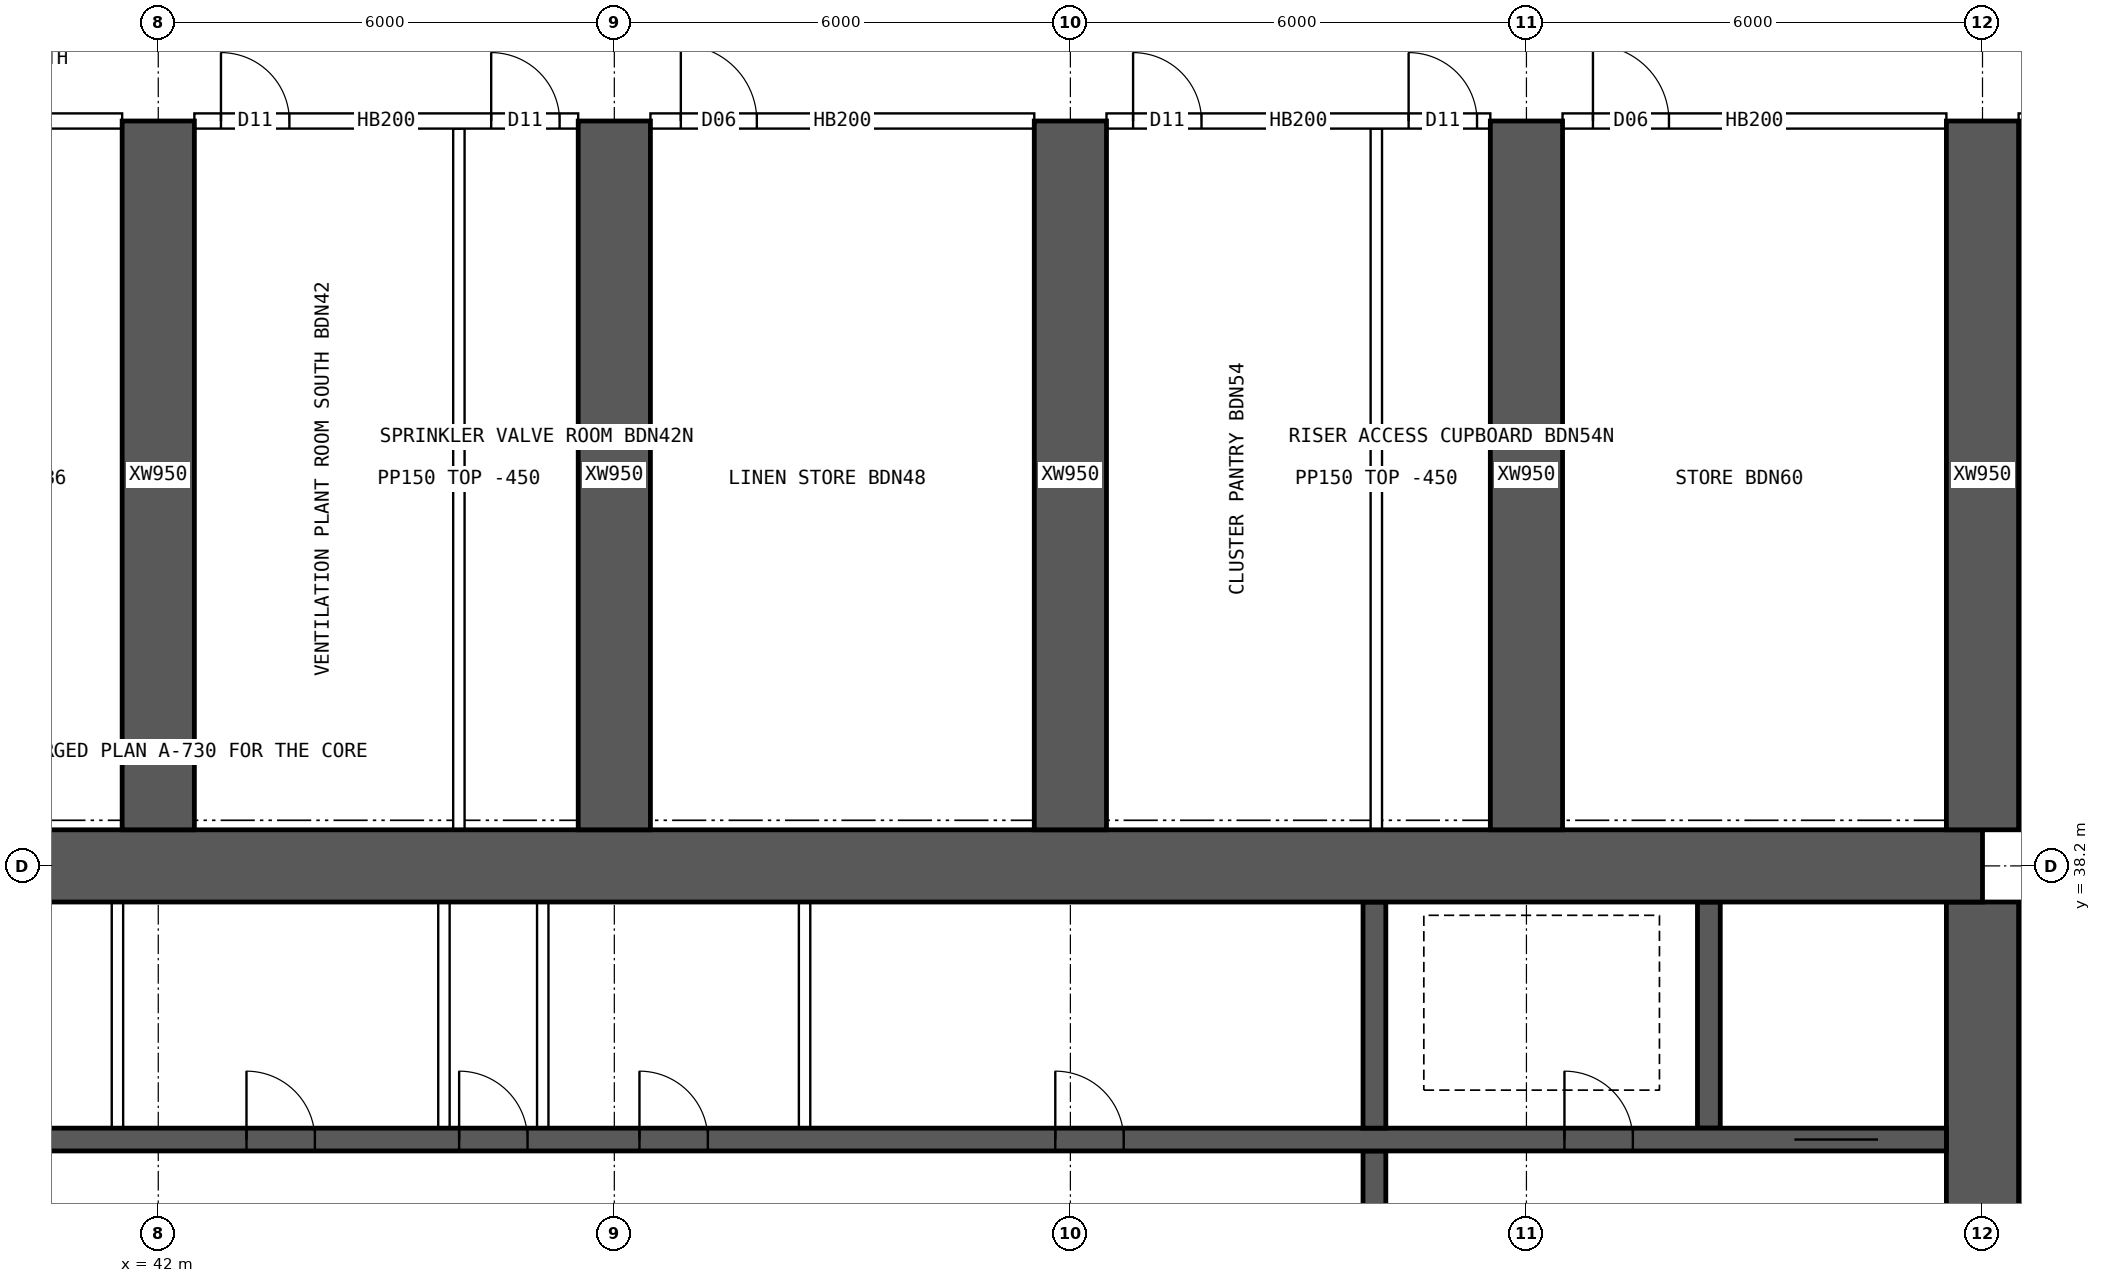
"""IFC4 building model, lengths in metres.
Left out: names, types, materials, properties, quantities, classifications, styles, units other than length and angle.
Written with IfcOpenShell. Run it as: python <this file> out.ifc"""

import sys

from ifc_helpers import new_model, si_unit, direction, frame, frame_2d, origin, place, context, subcontext, project, spatial, rectangle, extrude, element, fill, save


model = new_model("IFC4")
c1 = context("Model", 3, precision=1e-05, world=origin(), true_north=direction((0.0, 1.0)))
c2 = subcontext(c1, "Body", "Model", "MODEL_VIEW")
j1 = project(units=[si_unit("LENGTHUNIT", "METRE"), si_unit("PLANEANGLEUNIT", "RADIAN")], contexts=[c1])
p1 = place(None, origin())
s1 = spatial("IfcSite", under=j1, at=p1, CompositionType="ELEMENT")
p2 = place(p1, origin())
s2 = spatial("IfcBuilding", under=s1, at=p2, CompositionType="ELEMENT")
p3 = place(p2, frame((0.0, 0.0, 110.65)))
s3 = spatial("IfcBuildingStorey", under=s2, at=p3, CompositionType="ELEMENT", Elevation=110.65)
p4 = place(p3, frame((18.0, 38.2, 0.0), z_axis=(0.0, 0.0, 1.0), x_axis=(1.0, 0.0, 0.0)))
e1 = element("IfcWall", 1, at=p4, inside=s3, PredefinedType="SHEAR", context=c2, shape_type="SweptSolid", body=[
    extrude(rectangle(XDim=48.0, YDim=0.95, at=frame_2d((24.0, 0.0))), origin(), (0.0, 0.0, 1.0), 3.75),
])
p5 = place(p3, frame((66.0, 26.275, 0.0), z_axis=(0.0, 0.0, 1.0), x_axis=(0.0, 1.0, 0.0)))
e2 = element("IfcWall", 2, at=p5, inside=s3, PredefinedType="SHEAR", context=c2, shape_type="SweptSolid", body=[
    extrude(rectangle(XDim=11.45, YDim=0.95, at=frame_2d((5.725, 0.0))), origin(), (0.0, 0.0, 1.0), 3.75),
])
p6 = place(p5, frame((5.025, 0.0, 0.0)))
e3 = element("IfcOpeningElement", 3, at=p6, cuts=e2, PredefinedType="OPENING", context=c2, shape_type="SweptSolid", body=[
    extrude(rectangle(XDim=1.2, YDim=2.1, at=frame_2d((0.6, 1.05))), frame((0.0, 0.485, 0.0), z_axis=(0.0, -1.0, 0.0), x_axis=(1.0, 0.0, 0.0)), (0.0, 0.0, 1.0), 0.97),
])
p7 = place(p3, frame((18.475, 34.6, 0.0), z_axis=(0.0, 0.0, 1.0), x_axis=(1.0, 0.0, 0.0)))
e4 = element("IfcWall", 4, at=p7, inside=s3, PredefinedType="SHEAR", context=c2, shape_type="SweptSolid", body=[
    extrude(rectangle(XDim=47.05, YDim=0.3, at=frame_2d((23.525, 0.0))), origin(), (0.0, 0.0, 1.0), 3.75),
])
p8 = place(p7, frame((0.9, 0.0, 0.0)))
e5 = element("IfcOpeningElement", 5, at=p8, cuts=e4, PredefinedType="OPENING", context=c2, shape_type="SweptSolid", body=[
    extrude(rectangle(XDim=1.1, YDim=2.1, at=frame_2d((0.55, 1.05))), frame((0.0, 0.16, 0.0), z_axis=(0.0, -1.0, 0.0), x_axis=(1.0, 0.0, 0.0)), (0.0, 0.0, 1.0), 0.32),
])
p9 = place(p7, frame((45.05, 0.0, 0.0)))
e6 = element("IfcOpeningElement", 6, at=p9, cuts=e4, PredefinedType="OPENING", context=c2, shape_type="SweptSolid", body=[
    extrude(rectangle(XDim=1.1, YDim=2.1, at=frame_2d((0.55, 1.05))), frame((0.0, 0.16, 0.0), z_axis=(0.0, -1.0, 0.0), x_axis=(1.0, 0.0, 0.0)), (0.0, 0.0, 1.0), 0.32),
])
p10 = place(p7, frame((4.125, 0.0, 0.0)))
e7 = element("IfcOpeningElement", 7, at=p10, cuts=e4, PredefinedType="OPENING", context=c2, shape_type="SweptSolid", body=[
    extrude(rectangle(XDim=0.9, YDim=2.1, at=frame_2d((0.45, 1.05))), frame((0.0, 0.16, 0.0), z_axis=(0.0, -1.0, 0.0), x_axis=(1.0, 0.0, 0.0)), (0.0, 0.0, 1.0), 0.32),
])
p11 = place(p7, frame((42.025, 0.0, 0.0)))
e8 = element("IfcOpeningElement", 8, at=p11, cuts=e4, PredefinedType="OPENING", context=c2, shape_type="SweptSolid", body=[
    extrude(rectangle(XDim=0.9, YDim=2.1, at=frame_2d((0.45, 1.05))), frame((0.0, 0.16, 0.0), z_axis=(0.0, -1.0, 0.0), x_axis=(1.0, 0.0, 0.0)), (0.0, 0.0, 1.0), 0.32),
])
p12 = place(p7, frame((8.9, 0.0, 0.0)))
e9 = element("IfcOpeningElement", 9, at=p12, cuts=e4, PredefinedType="OPENING", context=c2, shape_type="SweptSolid", body=[
    extrude(rectangle(XDim=0.9, YDim=2.1, at=frame_2d((0.45, 1.05))), frame((0.0, 0.16, 0.0), z_axis=(0.0, -1.0, 0.0), x_axis=(1.0, 0.0, 0.0)), (0.0, 0.0, 1.0), 0.32),
])
p13 = place(p7, frame((12.874, 0.0, 0.0)))
e10 = element("IfcOpeningElement", 10, at=p13, cuts=e4, PredefinedType="OPENING", context=c2, shape_type="SweptSolid", body=[
    extrude(rectangle(XDim=0.9, YDim=2.1, at=frame_2d((0.45, 1.05))), frame((0.0, 0.16, 0.0), z_axis=(0.0, -1.0, 0.0), x_axis=(1.0, 0.0, 0.0)), (0.0, 0.0, 1.0), 0.32),
])
p14 = place(p7, frame((16.521, 0.0, 0.0)))
e11 = element("IfcOpeningElement", 11, at=p14, cuts=e4, PredefinedType="OPENING", context=c2, shape_type="SweptSolid", body=[
    extrude(rectangle(XDim=0.9, YDim=2.1, at=frame_2d((0.45, 1.05))), frame((0.0, 0.16, 0.0), z_axis=(0.0, -1.0, 0.0), x_axis=(1.0, 0.0, 0.0)), (0.0, 0.0, 1.0), 0.32),
])
p15 = place(p7, frame((20.28, 0.0, 0.0)))
e12 = element("IfcOpeningElement", 12, at=p15, cuts=e4, PredefinedType="OPENING", context=c2, shape_type="SweptSolid", body=[
    extrude(rectangle(XDim=0.9, YDim=2.1, at=frame_2d((0.45, 1.05))), frame((0.0, 0.16, 0.0), z_axis=(0.0, -1.0, 0.0), x_axis=(1.0, 0.0, 0.0)), (0.0, 0.0, 1.0), 0.32),
])
p16 = place(p7, frame((24.686, 0.0, 0.0)))
e13 = element("IfcOpeningElement", 13, at=p16, cuts=e4, PredefinedType="OPENING", context=c2, shape_type="SweptSolid", body=[
    extrude(rectangle(XDim=0.9, YDim=2.1, at=frame_2d((0.45, 1.05))), frame((0.0, 0.16, 0.0), z_axis=(0.0, -1.0, 0.0), x_axis=(1.0, 0.0, 0.0)), (0.0, 0.0, 1.0), 0.32),
])
p17 = place(p7, frame((27.483, 0.0, 0.0)))
e14 = element("IfcOpeningElement", 14, at=p17, cuts=e4, PredefinedType="OPENING", context=c2, shape_type="SweptSolid", body=[
    extrude(rectangle(XDim=0.9, YDim=2.1, at=frame_2d((0.45, 1.05))), frame((0.0, 0.16, 0.0), z_axis=(0.0, -1.0, 0.0), x_axis=(1.0, 0.0, 0.0)), (0.0, 0.0, 1.0), 0.32),
])
p18 = place(p7, frame((29.856, 0.0, 0.0)))
e15 = element("IfcOpeningElement", 15, at=p18, cuts=e4, PredefinedType="OPENING", context=c2, shape_type="SweptSolid", body=[
    extrude(rectangle(XDim=0.9, YDim=2.1, at=frame_2d((0.45, 1.05))), frame((0.0, 0.16, 0.0), z_axis=(0.0, -1.0, 0.0), x_axis=(1.0, 0.0, 0.0)), (0.0, 0.0, 1.0), 0.32),
])
p19 = place(p7, frame((35.326, 0.0, 0.0)))
e16 = element("IfcOpeningElement", 16, at=p19, cuts=e4, PredefinedType="OPENING", context=c2, shape_type="SweptSolid", body=[
    extrude(rectangle(XDim=0.9, YDim=2.1, at=frame_2d((0.45, 1.05))), frame((0.0, 0.16, 0.0), z_axis=(0.0, -1.0, 0.0), x_axis=(1.0, 0.0, 0.0)), (0.0, 0.0, 1.0), 0.32),
])
p20 = place(p3, frame((58.0, 30.55, 0.0), z_axis=(0.0, 0.0, 1.0), x_axis=(0.0, 1.0, 0.0)))
e17 = element("IfcWall", 17, at=p20, inside=s3, PredefinedType="SHEAR", context=c2, shape_type="SweptSolid", body=[
    extrude(rectangle(XDim=3.9, YDim=0.3, at=frame_2d((1.95, 0.0))), origin(), (0.0, 0.0, 1.0), 3.75),
])
p21 = place(p20, frame((1.4, 0.0, 0.0)))
e18 = element("IfcOpeningElement", 18, at=p21, cuts=e17, PredefinedType="OPENING", context=c2, shape_type="SweptSolid", body=[
    extrude(rectangle(XDim=1.2, YDim=2.1, at=frame_2d((0.6, 1.05))), frame((0.0, 0.16, 0.0), z_axis=(0.0, -1.0, 0.0), x_axis=(1.0, 0.0, 0.0)), (0.0, 0.0, 1.0), 0.32),
])
for number, where, z_axis, x_axis in (
    (19, (62.4, 34.75, 0.0), (0.0, 0.0, 1.0), (0.0, 1.0, 0.0)),
    (20, (58.0, 34.75, 0.0), (0.0, 0.0, 1.0), (0.0, 1.0, 0.0)),
):
    element("IfcWall", number, at=place(p3, frame(where, z_axis=z_axis, x_axis=x_axis)), inside=s3, PredefinedType="SHEAR", context=c2, shape_type="SweptSolid", body=[
        extrude(rectangle(XDim=2.975, YDim=0.3, at=frame_2d((1.488, 0.0))), origin(), (0.0, 0.0, 1.0), 3.75),
    ])
for number, where, z_axis, x_axis in (
    (21, (42.0, 38.675, 0.0), (0.0, 0.0, 1.0), (0.0, 1.0, 0.0)),
    (22, (48.0, 38.675, 0.0), (0.0, 0.0, 1.0), (0.0, 1.0, 0.0)),
    (23, (54.0, 38.675, 0.0), (0.0, 0.0, 1.0), (0.0, 1.0, 0.0)),
    (24, (60.0, 38.675, 0.0), (0.0, 0.0, 1.0), (0.0, 1.0, 0.0)),
    (25, (66.0, 38.675, 0.0), (0.0, 0.0, 1.0), (0.0, 1.0, 0.0)),
):
    element("IfcWall", number, at=place(p3, frame(where, z_axis=z_axis, x_axis=x_axis)), inside=s3, PredefinedType="SHEAR", context=c2, shape_type="SweptSolid", body=[
        extrude(rectangle(XDim=9.325, YDim=0.95, at=frame_2d((4.663, 0.0))), origin(), (0.0, 0.0, 1.0), 3.75),
    ])
for number, where, z_axis, x_axis in (
    (26, (41.463, 34.75, 0.0), (0.0, 0.0, 1.0), (0.0, 1.0, 0.0)),
    (27, (45.758, 34.75, 0.0), (0.0, 0.0, 1.0), (0.0, 1.0, 0.0)),
    (28, (47.058, 34.75, 0.0), (0.0, 0.0, 1.0), (0.0, 1.0, 0.0)),
    (29, (50.503, 34.75, 0.0), (0.0, 0.0, 1.0), (0.0, 1.0, 0.0)),
):
    element("IfcWall", number, at=place(p3, frame(where, z_axis=z_axis, x_axis=x_axis)), inside=s3, PredefinedType="SOLIDWALL", context=c2, shape_type="SweptSolid", body=[
        extrude(rectangle(XDim=2.975, YDim=0.15, at=frame_2d((1.488, 0.0))), origin(), (0.0, 0.0, 1.0), 3.3),
    ])
p22 = place(p3, frame((36.475, 48.0, 0.0), z_axis=(0.0, 0.0, 1.0), x_axis=(1.0, 0.0, 0.0)))
e30 = element("IfcWall", 30, at=p22, inside=s3, PredefinedType="SOLIDWALL", context=c2, shape_type="SweptSolid", body=[
    extrude(rectangle(XDim=5.05, YDim=0.2, at=frame_2d((2.525, 0.0))), origin(), (0.0, 0.0, 1.0), 3.3),
])
p23 = place(p22, frame((0.4, 0.0, 0.0)))
e31 = element("IfcOpeningElement", 31, at=p23, cuts=e30, PredefinedType="OPENING", context=c2, shape_type="SweptSolid", body=[
    extrude(rectangle(XDim=1.0, YDim=2.1, at=frame_2d((0.5, 1.05))), frame((0.0, 0.11, 0.0), z_axis=(0.0, -1.0, 0.0), x_axis=(1.0, 0.0, 0.0)), (0.0, 0.0, 1.0), 0.22),
])
p24 = place(p3, frame((42.475, 48.0, 0.0), z_axis=(0.0, 0.0, 1.0), x_axis=(1.0, 0.0, 0.0)))
e32 = element("IfcWall", 32, at=p24, inside=s3, PredefinedType="SOLIDWALL", context=c2, shape_type="SweptSolid", body=[
    extrude(rectangle(XDim=5.05, YDim=0.2, at=frame_2d((2.525, 0.0))), origin(), (0.0, 0.0, 1.0), 3.3),
])
p25 = place(p24, frame((0.35, 0.0, 0.0)))
e33 = element("IfcOpeningElement", 33, at=p25, cuts=e32, PredefinedType="OPENING", context=c2, shape_type="SweptSolid", body=[
    extrude(rectangle(XDim=0.9, YDim=2.1, at=frame_2d((0.45, 1.05))), frame((0.0, 0.11, 0.0), z_axis=(0.0, -1.0, 0.0), x_axis=(1.0, 0.0, 0.0)), (0.0, 0.0, 1.0), 0.22),
])
p26 = place(p24, frame((3.905, 0.0, 0.0)))
e34 = element("IfcOpeningElement", 34, at=p26, cuts=e32, PredefinedType="OPENING", context=c2, shape_type="SweptSolid", body=[
    extrude(rectangle(XDim=0.9, YDim=2.1, at=frame_2d((0.45, 1.05))), frame((0.0, 0.11, 0.0), z_axis=(0.0, -1.0, 0.0), x_axis=(1.0, 0.0, 0.0)), (0.0, 0.0, 1.0), 0.22),
])
p27 = place(p3, frame((48.475, 48.0, 0.0), z_axis=(0.0, 0.0, 1.0), x_axis=(1.0, 0.0, 0.0)))
e35 = element("IfcWall", 35, at=p27, inside=s3, PredefinedType="SOLIDWALL", context=c2, shape_type="SweptSolid", body=[
    extrude(rectangle(XDim=5.05, YDim=0.2, at=frame_2d((2.525, 0.0))), origin(), (0.0, 0.0, 1.0), 3.3),
])
p28 = place(p27, frame((0.4, 0.0, 0.0)))
e36 = element("IfcOpeningElement", 36, at=p28, cuts=e35, PredefinedType="OPENING", context=c2, shape_type="SweptSolid", body=[
    extrude(rectangle(XDim=1.0, YDim=2.1, at=frame_2d((0.5, 1.05))), frame((0.0, 0.11, 0.0), z_axis=(0.0, -1.0, 0.0), x_axis=(1.0, 0.0, 0.0)), (0.0, 0.0, 1.0), 0.22),
])
p29 = place(p3, frame((54.475, 48.0, 0.0), z_axis=(0.0, 0.0, 1.0), x_axis=(1.0, 0.0, 0.0)))
e37 = element("IfcWall", 37, at=p29, inside=s3, PredefinedType="SOLIDWALL", context=c2, shape_type="SweptSolid", body=[
    extrude(rectangle(XDim=5.05, YDim=0.2, at=frame_2d((2.525, 0.0))), origin(), (0.0, 0.0, 1.0), 3.3),
])
p30 = place(p29, frame((0.35, 0.0, 0.0)))
e38 = element("IfcOpeningElement", 38, at=p30, cuts=e37, PredefinedType="OPENING", context=c2, shape_type="SweptSolid", body=[
    extrude(rectangle(XDim=0.9, YDim=2.1, at=frame_2d((0.45, 1.05))), frame((0.0, 0.11, 0.0), z_axis=(0.0, -1.0, 0.0), x_axis=(1.0, 0.0, 0.0)), (0.0, 0.0, 1.0), 0.22),
])
p31 = place(p29, frame((3.975, 0.0, 0.0)))
e39 = element("IfcOpeningElement", 39, at=p31, cuts=e37, PredefinedType="OPENING", context=c2, shape_type="SweptSolid", body=[
    extrude(rectangle(XDim=0.9, YDim=2.1, at=frame_2d((0.45, 1.05))), frame((0.0, 0.11, 0.0), z_axis=(0.0, -1.0, 0.0), x_axis=(1.0, 0.0, 0.0)), (0.0, 0.0, 1.0), 0.22),
])
p32 = place(p3, frame((60.475, 48.0, 0.0), z_axis=(0.0, 0.0, 1.0), x_axis=(1.0, 0.0, 0.0)))
e40 = element("IfcWall", 40, at=p32, inside=s3, PredefinedType="SOLIDWALL", context=c2, shape_type="SweptSolid", body=[
    extrude(rectangle(XDim=5.05, YDim=0.2, at=frame_2d((2.525, 0.0))), origin(), (0.0, 0.0, 1.0), 3.3),
])
p33 = place(p32, frame((0.4, 0.0, 0.0)))
e41 = element("IfcOpeningElement", 41, at=p33, cuts=e40, PredefinedType="OPENING", context=c2, shape_type="SweptSolid", body=[
    extrude(rectangle(XDim=1.0, YDim=2.1, at=frame_2d((0.5, 1.05))), frame((0.0, 0.11, 0.0), z_axis=(0.0, -1.0, 0.0), x_axis=(1.0, 0.0, 0.0)), (0.0, 0.0, 1.0), 0.22),
])
p34 = place(p3, frame((66.475, 48.0, 0.0), z_axis=(0.0, 0.0, 1.0), x_axis=(1.0, 0.0, 0.0)))
e42 = element("IfcWall", 42, at=p34, inside=s3, PredefinedType="SOLIDWALL", context=c2, shape_type="SweptSolid", body=[
    extrude(rectangle(XDim=1.925, YDim=0.2, at=frame_2d((0.962, 0.0))), origin(), (0.0, 0.0, 1.0), 3.3),
])
p35 = place(p34, frame((0.05, 0.0, 0.0)))
e43 = element("IfcOpeningElement", 43, at=p35, cuts=e42, PredefinedType="OPENING", context=c2, shape_type="SweptSolid", body=[
    extrude(rectangle(XDim=1.2, YDim=2.1, at=frame_2d((0.6, 1.05))), frame((0.0, 0.11, 0.0), z_axis=(0.0, -1.0, 0.0), x_axis=(1.0, 0.0, 0.0)), (0.0, 0.0, 1.0), 0.22),
])
for number, where, z_axis, x_axis in (
    (44, (45.955, 38.675, 0.0), (0.0, 0.0, 1.0), (0.0, 1.0, 0.0)),
    (45, (58.025, 38.675, 0.0), (0.0, 0.0, 1.0), (0.0, 1.0, 0.0)),
):
    element("IfcWall", number, at=place(p3, frame(where, z_axis=z_axis, x_axis=x_axis)), inside=s3, PredefinedType="PARTITIONING", context=c2, shape_type="SweptSolid", body=[
        extrude(rectangle(XDim=9.225, YDim=0.15, at=frame_2d((4.612, 0.0))), origin(), (0.0, 0.0, 1.0), 3.3),
    ])
p36 = place(p9, origin())
e46 = element("IfcDoor", 46, at=p36, inside=s3, OperationType="DOUBLE_DOOR_SLIDING", PredefinedType="DOOR", context=c2, shape_type="SweptSolid", body=[
    extrude(rectangle(XDim=1.1, YDim=2.1, at=frame_2d((0.55, 1.05))), frame((0.0, 0.025, 0.0), z_axis=(0.0, -1.0, 0.0), x_axis=(1.0, 0.0, 0.0)), (0.0, 0.0, 1.0), 0.05),
])
fill(e6, e46)
p37 = place(p11, origin())
e47 = element("IfcDoor", 47, at=p37, inside=s3, OperationType="SINGLE_SWING_LEFT", PredefinedType="DOOR", context=c2, shape_type="SweptSolid", body=[
    extrude(rectangle(XDim=0.9, YDim=2.1, at=frame_2d((0.45, 1.05))), frame((0.0, 0.025, 0.0), z_axis=(0.0, -1.0, 0.0), x_axis=(1.0, 0.0, 0.0)), (0.0, 0.0, 1.0), 0.05),
])
fill(e8, e47)
p38 = place(p16, origin())
e48 = element("IfcDoor", 48, at=p38, inside=s3, OperationType="SINGLE_SWING_LEFT", PredefinedType="DOOR", context=c2, shape_type="SweptSolid", body=[
    extrude(rectangle(XDim=0.9, YDim=2.1, at=frame_2d((0.45, 1.05))), frame((0.0, 0.025, 0.0), z_axis=(0.0, -1.0, 0.0), x_axis=(1.0, 0.0, 0.0)), (0.0, 0.0, 1.0), 0.05),
])
fill(e13, e48)
p39 = place(p17, origin())
e49 = element("IfcDoor", 49, at=p39, inside=s3, OperationType="SINGLE_SWING_LEFT", PredefinedType="DOOR", context=c2, shape_type="SweptSolid", body=[
    extrude(rectangle(XDim=0.9, YDim=2.1, at=frame_2d((0.45, 1.05))), frame((0.0, 0.025, 0.0), z_axis=(0.0, -1.0, 0.0), x_axis=(1.0, 0.0, 0.0)), (0.0, 0.0, 1.0), 0.05),
])
fill(e14, e49)
p40 = place(p18, origin())
e50 = element("IfcDoor", 50, at=p40, inside=s3, OperationType="SINGLE_SWING_LEFT", PredefinedType="DOOR", context=c2, shape_type="SweptSolid", body=[
    extrude(rectangle(XDim=0.9, YDim=2.1, at=frame_2d((0.45, 1.05))), frame((0.0, 0.025, 0.0), z_axis=(0.0, -1.0, 0.0), x_axis=(1.0, 0.0, 0.0)), (0.0, 0.0, 1.0), 0.05),
])
fill(e15, e50)
p41 = place(p19, origin())
e51 = element("IfcDoor", 51, at=p41, inside=s3, OperationType="SINGLE_SWING_LEFT", PredefinedType="DOOR", context=c2, shape_type="SweptSolid", body=[
    extrude(rectangle(XDim=0.9, YDim=2.1, at=frame_2d((0.45, 1.05))), frame((0.0, 0.025, 0.0), z_axis=(0.0, -1.0, 0.0), x_axis=(1.0, 0.0, 0.0)), (0.0, 0.0, 1.0), 0.05),
])
fill(e16, e51)
p42 = place(p25, origin())
e52 = element("IfcDoor", 52, at=p42, inside=s3, OperationType="SINGLE_SWING_LEFT", PredefinedType="DOOR", context=c2, shape_type="SweptSolid", body=[
    extrude(rectangle(XDim=0.9, YDim=2.1, at=frame_2d((0.45, 1.05))), frame((0.0, 0.025, 0.0), z_axis=(0.0, -1.0, 0.0), x_axis=(1.0, 0.0, 0.0)), (0.0, 0.0, 1.0), 0.05),
])
fill(e33, e52)
p43 = place(p26, origin())
e53 = element("IfcDoor", 53, at=p43, inside=s3, OperationType="SINGLE_SWING_LEFT", PredefinedType="DOOR", context=c2, shape_type="SweptSolid", body=[
    extrude(rectangle(XDim=0.9, YDim=2.1, at=frame_2d((0.45, 1.05))), frame((0.0, 0.025, 0.0), z_axis=(0.0, -1.0, 0.0), x_axis=(1.0, 0.0, 0.0)), (0.0, 0.0, 1.0), 0.05),
])
fill(e34, e53)
p44 = place(p28, origin())
e54 = element("IfcDoor", 54, at=p44, inside=s3, OperationType="SINGLE_SWING_LEFT", PredefinedType="DOOR", context=c2, shape_type="SweptSolid", body=[
    extrude(rectangle(XDim=1.0, YDim=2.1, at=frame_2d((0.5, 1.05))), frame((0.0, 0.025, 0.0), z_axis=(0.0, -1.0, 0.0), x_axis=(1.0, 0.0, 0.0)), (0.0, 0.0, 1.0), 0.05),
])
fill(e36, e54)
p45 = place(p30, origin())
e55 = element("IfcDoor", 55, at=p45, inside=s3, OperationType="SINGLE_SWING_LEFT", PredefinedType="DOOR", context=c2, shape_type="SweptSolid", body=[
    extrude(rectangle(XDim=0.9, YDim=2.1, at=frame_2d((0.45, 1.05))), frame((0.0, 0.025, 0.0), z_axis=(0.0, -1.0, 0.0), x_axis=(1.0, 0.0, 0.0)), (0.0, 0.0, 1.0), 0.05),
])
fill(e38, e55)
p46 = place(p31, origin())
e56 = element("IfcDoor", 56, at=p46, inside=s3, OperationType="SINGLE_SWING_LEFT", PredefinedType="DOOR", context=c2, shape_type="SweptSolid", body=[
    extrude(rectangle(XDim=0.9, YDim=2.1, at=frame_2d((0.45, 1.05))), frame((0.0, 0.025, 0.0), z_axis=(0.0, -1.0, 0.0), x_axis=(1.0, 0.0, 0.0)), (0.0, 0.0, 1.0), 0.05),
])
fill(e39, e56)
p47 = place(p33, origin())
e57 = element("IfcDoor", 57, at=p47, inside=s3, OperationType="SINGLE_SWING_LEFT", PredefinedType="DOOR", context=c2, shape_type="SweptSolid", body=[
    extrude(rectangle(XDim=1.0, YDim=2.1, at=frame_2d((0.5, 1.05))), frame((0.0, 0.025, 0.0), z_axis=(0.0, -1.0, 0.0), x_axis=(1.0, 0.0, 0.0)), (0.0, 0.0, 1.0), 0.05),
])
fill(e41, e57)
save(model, sys.argv[1])
